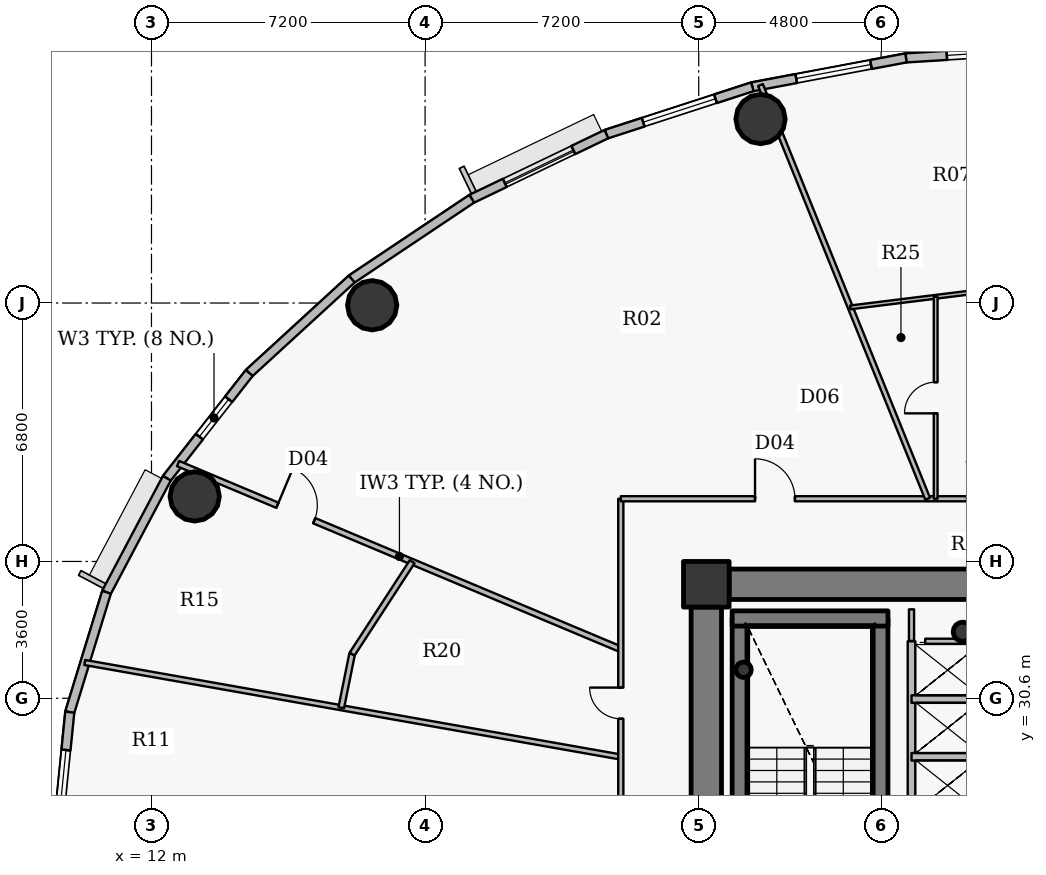
"""IFC4 building model, lengths in metres.
Left out: names, types, materials, properties, quantities, classifications, styles, units other than length and angle.
Written with IfcOpenShell. Run it as: python <this file> out.ifc"""

import sys

from ifc_helpers import new_model, si_unit, direction, frame, frame_2d, origin, origin_2d, place, context, subcontext, project, spatial, rectangle, hollow_circle, extrude, source, transform, mapped, element, fill, save


model = new_model("IFC4")
c1 = context("Model", 3, precision=1e-05, world=origin(), true_north=direction((0.0, 1.0)))
c2 = subcontext(c1, "Body", "Model", "MODEL_VIEW")
j1 = project(units=[si_unit("LENGTHUNIT", "METRE"), si_unit("PLANEANGLEUNIT", "RADIAN")], contexts=[c1])
p1 = place(None, origin())
s1 = spatial("IfcSite", under=j1, at=p1, CompositionType="ELEMENT")
p2 = place(p1, origin())
s2 = spatial("IfcBuilding", under=s1, at=p2, CompositionType="ELEMENT")
p3 = place(p2, frame((0.0, 0.0, 186.15)))
s3 = spatial("IfcBuildingStorey", under=s2, at=p3, CompositionType="ELEMENT", Elevation=186.15)
p4 = place(p3, frame((26.6, 33.6, 0.0), z_axis=(0.0, 0.0, 1.0), x_axis=(1.0, 0.0, 0.0)))
e1 = element("IfcColumn", 1, at=p4, inside=s3, PredefinedType="COLUMN", context=c2, shape_type="SweptSolid", body=[
    extrude(rectangle(XDim=1.2, YDim=1.2, at=origin_2d()), origin(), (0.0, 0.0, 1.0), 3.75),
])
p5 = place(p3, frame((33.35, 32.35, 0.0), z_axis=(0.0, 0.0, 1.0), x_axis=(1.0, 0.0, 0.0)))
e2 = element("IfcColumn", 2, at=p5, inside=s3, PredefinedType="COLUMN", context=c2, shape_type="SweptSolid", body=[
    extrude(hollow_circle(Radius=0.254, WallThickness=0.02, at=origin_2d()), origin(), (0.0, 0.0, 1.0), 3.75),
])
p6 = place(p3, frame((27.48, 24.1, 0.0), z_axis=(0.0, 0.0, 1.0), x_axis=(0.0, 1.0, 0.0)))
e3 = element("IfcWall", 3, at=p6, inside=s3, PredefinedType="SHEAR", context=c2, shape_type="SweptSolid", body=[
    extrude(rectangle(XDim=8.6, YDim=0.4, at=frame_2d((4.3, 0.0))), origin(), (0.0, 0.0, 1.0), 3.75),
])
p7 = place(p3, frame((31.18, 27.8, 0.0), z_axis=(0.0, 0.0, 1.0), x_axis=(0.0, 1.0, 0.0)))
e4 = element("IfcWall", 4, at=p7, inside=s3, PredefinedType="SHEAR", context=c2, shape_type="SweptSolid", body=[
    extrude(rectangle(XDim=4.9, YDim=0.4, at=frame_2d((2.45, 0.0))), origin(), (0.0, 0.0, 1.0), 3.75),
])
p8 = place(p3, frame((27.28, 32.7, 0.0), z_axis=(0.0, 0.0, 1.0), x_axis=(1.0, 0.0, 0.0)))
e5 = element("IfcWall", 5, at=p8, inside=s3, PredefinedType="SHEAR", context=c2, shape_type="SweptSolid", body=[
    extrude(rectangle(XDim=4.1, YDim=0.4, at=frame_2d((2.05, 0.0))), origin(), (0.0, 0.0, 1.0), 3.75),
])
p9 = place(p3, frame((27.58, 31.35, 0.0), z_axis=(0.0, 0.0, 1.0), x_axis=(1.0, 0.0, 0.0)))
e6 = element("IfcColumn", 6, at=p9, inside=s3, PredefinedType="COLUMN", context=c2, shape_type="SweptSolid", body=[
    extrude(hollow_circle(Radius=0.203, WallThickness=0.016, at=origin_2d()), origin(), (0.0, 0.0, 1.0), 3.75),
])
p10 = place(p3, frame((27.2, 33.6, 0.0), z_axis=(0.0, 0.0, 1.0), x_axis=(1.0, 0.0, 0.0)))
e7 = element("IfcWall", 7, at=p10, inside=s3, PredefinedType="SHEAR", context=c2, shape_type="SweptSolid", body=[
    extrude(rectangle(XDim=17.6, YDim=0.8, at=frame_2d((8.8, 0.0))), origin(), (0.0, 0.0, 1.0), 2.95),
])
p11 = place(p10, frame((13.45, 0.0, 0.0)))
e8 = element("IfcOpeningElement", 8, at=p11, cuts=e7, PredefinedType="OPENING", context=c2, shape_type="SweptSolid", body=[
    extrude(rectangle(XDim=1.15, YDim=2.15, at=origin_2d()), frame((0.575, 0.41, 1.075), z_axis=(0.0, -1.0, 0.0), x_axis=(1.0, 0.0, 0.0)), (0.0, 0.0, 1.0), 0.82),
])
p12 = place(p3, frame((26.6, 21.0, 0.0), z_axis=(0.0, 0.0, 1.0), x_axis=(0.0, 1.0, 0.0)))
e9 = element("IfcWall", 9, at=p12, inside=s3, PredefinedType="SHEAR", context=c2, shape_type="SweptSolid", body=[
    extrude(rectangle(XDim=12.0, YDim=0.8, at=frame_2d((6.0, 0.0))), origin(), (0.0, 0.0, 1.0), 2.95),
])
p13 = place(p12, frame((1.061, 0.0, 0.0)))
e10 = element("IfcOpeningElement", 10, at=p13, cuts=e9, PredefinedType="OPENING", context=c2, shape_type="SweptSolid", body=[
    extrude(rectangle(XDim=1.15, YDim=2.15, at=origin_2d()), frame((0.575, 0.41, 1.075), z_axis=(0.0, -1.0, 0.0), x_axis=(1.0, 0.0, 0.0)), (0.0, 0.0, 1.0), 0.82),
])
for number, where, z_axis, x_axis in (
    (11, (28.027, 45.841, 0.0), (0.0, 0.0, 1.0), (1.0, 0.0, 0.0)),
    (12, (17.808, 40.942, 0.0), (0.0, 0.0, 1.0), (1.0, 0.0, 0.0)),
    (13, (13.137, 35.911, 0.0), (0.0, 0.0, 1.0), (1.0, 0.0, 0.0)),
):
    element("IfcColumn", number, at=place(p3, frame(where, z_axis=z_axis, x_axis=x_axis)), inside=s3, PredefinedType="COLUMN", context=c2, shape_type="SweptSolid", body=[
        extrude(hollow_circle(Radius=0.65, WallThickness=0.04, at=origin_2d()), origin(), (0.0, 0.0, 1.0), 3.75),
    ])
p14 = place(p3, frame((31.854, 47.449, 0.0), z_axis=(0.0, 0.0, 1.0), x_axis=(0.998104600619, 0.061540281305, 0.0)))
e14 = element("IfcWall", 14, at=p14, inside=s3, PredefinedType="SOLIDWALL", context=c2, shape_type="SweptSolid", body=[
    extrude(rectangle(XDim=4.154, YDim=0.24, at=frame_2d((2.077, 0.0))), origin(), (0.0, 0.0, 1.0), 3.5),
])
p15 = place(p14, frame((1.077, 0.0, 0.9)))
e15 = element("IfcOpeningElement", 15, at=p15, cuts=e14, PredefinedType="OPENING", context=c2, shape_type="SweptSolid", body=[
    extrude(rectangle(XDim=2.0, YDim=1.75, at=origin_2d()), frame((1.0, 0.13, 0.875), z_axis=(0.0, -1.0, 0.0), x_axis=(1.0, 0.0, 0.0)), (0.0, 0.0, 1.0), 0.26),
])
p16 = place(p3, frame((27.811, 46.689, 0.0), z_axis=(0.0, 0.0, 1.0), x_axis=(0.982788108205, 0.184736391573, 0.0)))
e16 = element("IfcWall", 16, at=p16, inside=s3, PredefinedType="SOLIDWALL", context=c2, shape_type="SweptSolid", body=[
    extrude(rectangle(XDim=4.114, YDim=0.24, at=frame_2d((2.057, 0.0))), origin(), (0.0, 0.0, 1.0), 3.5),
])
p17 = place(p16, frame((1.176, 0.0, 0.9)))
e17 = element("IfcOpeningElement", 17, at=p17, cuts=e16, PredefinedType="OPENING", context=c2, shape_type="SweptSolid", body=[
    extrude(rectangle(XDim=2.0, YDim=1.75, at=origin_2d()), frame((1.0, 0.13, 0.875), z_axis=(0.0, -1.0, 0.0), x_axis=(1.0, 0.0, 0.0)), (0.0, 0.0, 1.0), 0.26),
])
p18 = place(p3, frame((23.97, 45.444, 0.0), z_axis=(0.0, 0.0, 1.0), x_axis=(0.951209870236, 0.30854462038, 0.0)))
e18 = element("IfcWall", 18, at=p18, inside=s3, PredefinedType="SOLIDWALL", context=c2, shape_type="SweptSolid", body=[
    extrude(rectangle(XDim=4.038, YDim=0.24, at=frame_2d((2.019, 0.0))), origin(), (0.0, 0.0, 1.0), 3.5),
])
p19 = place(p18, frame((1.019, 0.0, 0.9)))
e19 = element("IfcOpeningElement", 19, at=p19, cuts=e18, PredefinedType="OPENING", context=c2, shape_type="SweptSolid", body=[
    extrude(rectangle(XDim=2.0, YDim=1.75, at=origin_2d()), frame((1.0, 0.13, 0.875), z_axis=(0.0, -1.0, 0.0), x_axis=(1.0, 0.0, 0.0)), (0.0, 0.0, 1.0), 0.26),
])
p20 = place(p3, frame((20.427, 43.743, 0.0), z_axis=(0.0, 0.0, 1.0), x_axis=(0.901564733809, 0.432644231155, 0.0)))
e20 = element("IfcWall", 20, at=p20, inside=s3, PredefinedType="SOLIDWALL", context=c2, shape_type="SweptSolid", body=[
    extrude(rectangle(XDim=3.93, YDim=0.24, at=frame_2d((1.965, 0.0))), origin(), (0.0, 0.0, 1.0), 3.5),
])
p21 = place(p20, frame((0.965, 0.0, 0.9)))
e21 = element("IfcOpeningElement", 21, at=p21, cuts=e20, PredefinedType="OPENING", context=c2, shape_type="SweptSolid", body=[
    extrude(rectangle(XDim=2.0, YDim=1.75, at=origin_2d()), frame((1.0, 0.13, 0.875), z_axis=(0.0, -1.0, 0.0), x_axis=(1.0, 0.0, 0.0)), (0.0, 0.0, 1.0), 0.26),
])
p22 = place(p3, frame((17.268, 41.631, 0.0), z_axis=(0.0, 0.0, 1.0), x_axis=(0.831228998277, 0.555930168657, 0.0)))
e22 = element("IfcWall", 22, at=p22, inside=s3, PredefinedType="SOLIDWALL", context=c2, shape_type="SweptSolid", body=[
    extrude(rectangle(XDim=3.8, YDim=0.24, at=frame_2d((1.9, 0.0))), origin(), (0.0, 0.0, 1.0), 3.5),
])
p23 = place(p3, frame((14.572, 39.158, 0.0), z_axis=(0.0, 0.0, 1.0), x_axis=(0.737076565834, 0.675809245349, 0.0)))
e23 = element("IfcWall", 23, at=p23, inside=s3, PredefinedType="SOLIDWALL", context=c2, shape_type="SweptSolid", body=[
    extrude(rectangle(XDim=3.658, YDim=0.24, at=frame_2d((1.829, 0.0))), origin(), (0.0, 0.0, 1.0), 3.5),
])
p24 = place(p3, frame((12.404, 36.388, 0.0), z_axis=(0.0, 0.0, 1.0), x_axis=(0.616287674549, 0.787521112224, 0.0)))
e24 = element("IfcWall", 24, at=p24, inside=s3, PredefinedType="SOLIDWALL", context=c2, shape_type="SweptSolid", body=[
    extrude(rectangle(XDim=3.517, YDim=0.24, at=frame_2d((1.759, 0.0))), origin(), (0.0, 0.0, 1.0), 3.5),
])
p25 = place(p24, frame((1.39, 0.0, 0.9)))
e25 = element("IfcOpeningElement", 25, at=p25, cuts=e24, PredefinedType="OPENING", context=c2, shape_type="SweptSolid", body=[
    extrude(rectangle(XDim=1.25, YDim=1.65, at=origin_2d()), frame((0.625, 0.13, 0.825), z_axis=(0.0, -1.0, 0.0), x_axis=(1.0, 0.0, 0.0)), (0.0, 0.0, 1.0), 0.26),
])
p26 = place(p3, frame((10.817, 33.389, 0.0), z_axis=(0.0, 0.0, 1.0), x_axis=(0.467586874938, 0.88394712194, 0.0)))
e26 = element("IfcWall", 26, at=p26, inside=s3, PredefinedType="SOLIDWALL", context=c2, shape_type="SweptSolid", body=[
    extrude(rectangle(XDim=3.393, YDim=0.24, at=frame_2d((1.697, 0.0))), origin(), (0.0, 0.0, 1.0), 3.5),
])
p27 = place(p3, frame((9.85, 30.234, 0.0), z_axis=(0.0, 0.0, 1.0), x_axis=(0.293097995113, 0.956082405058, 0.0)))
e27 = element("IfcWall", 27, at=p27, inside=s3, PredefinedType="SOLIDWALL", context=c2, shape_type="SweptSolid", body=[
    extrude(rectangle(XDim=3.3, YDim=0.24, at=frame_2d((1.65, 0.0))), origin(), (0.0, 0.0, 1.0), 3.5),
])
p28 = place(p3, frame((9.525, 27.0, 0.0), z_axis=(0.0, 0.0, 1.0), x_axis=(0.100061534614, 0.994981250723, 0.0)))
e28 = element("IfcWall", 28, at=p28, inside=s3, PredefinedType="SOLIDWALL", context=c2, shape_type="SweptSolid", body=[
    extrude(rectangle(XDim=3.25, YDim=0.24, at=frame_2d((1.625, 0.0))), origin(), (0.0, 0.0, 1.0), 3.5),
])
p29 = place(p28, frame((1.0, 0.0, 0.9)))
e29 = element("IfcOpeningElement", 29, at=p29, cuts=e28, PredefinedType="OPENING", context=c2, shape_type="SweptSolid", body=[
    extrude(rectangle(XDim=1.25, YDim=1.65, at=origin_2d()), frame((0.625, 0.13, 0.825), z_axis=(0.0, -1.0, 0.0), x_axis=(1.0, 0.0, 0.0)), (0.0, 0.0, 1.0), 0.26),
])
p30 = place(p3, frame((10.246, 31.541, 0.0), z_axis=(0.0, 0.0, 1.0), x_axis=(0.984807060168, -0.173652106936, 0.0)))
e30 = element("IfcWall", 30, at=p30, inside=s3, PredefinedType="PARTITIONING", context=c2, shape_type="SweptSolid", body=[
    extrude(rectangle(XDim=14.322, YDim=0.135, at=frame_2d((7.161, 0.0))), origin(), (0.0, 0.0, 1.0), 2.935),
])
p31 = place(p3, frame((12.7, 36.775, 0.0), z_axis=(0.0, 0.0, 1.0), x_axis=(0.922134788074, -0.386868753745, 0.0)))
e31 = element("IfcWall", 31, at=p31, inside=s3, PredefinedType="PARTITIONING", context=c2, shape_type="SweptSolid", body=[
    extrude(rectangle(XDim=12.633, YDim=0.15, at=frame_2d((6.317, 0.0))), origin(), (0.0, 0.0, 1.0), 2.935),
])
p32 = place(p31, frame((2.834, 0.0, 0.0)))
e32 = element("IfcOpeningElement", 32, at=p32, cuts=e31, PredefinedType="OPENING", context=c2, shape_type="SweptSolid", body=[
    extrude(rectangle(XDim=1.05, YDim=2.15, at=origin_2d()), frame((0.525, 0.085, 1.075), z_axis=(0.0, -1.0, 0.0), x_axis=(1.0, 0.0, 0.0)), (0.0, 0.0, 1.0), 0.17),
])
p33 = place(p3, frame((16.994, 30.351, 0.0), z_axis=(0.0, 0.0, 1.0), x_axis=(0.198136589313, 0.98017441916, 0.0)))
e33 = element("IfcWall", 33, at=p33, inside=s3, PredefinedType="PARTITIONING", context=c2, shape_type="SweptSolid", body=[
    extrude(rectangle(XDim=1.44, YDim=0.15, at=frame_2d((0.72, 0.0))), origin(), (0.0, 0.0, 1.0), 3.5),
])
p34 = place(p3, frame((17.279, 31.763, 0.0), z_axis=(0.0, 0.0, 1.0), x_axis=(0.545388220317, 0.8381835653, 0.0)))
e34 = element("IfcWall", 34, at=p34, inside=s3, PredefinedType="PARTITIONING", context=c2, shape_type="SweptSolid", body=[
    extrude(rectangle(XDim=2.897, YDim=0.15, at=frame_2d((1.448, 0.0))), origin(), (0.0, 0.0, 1.0), 2.935),
])
p35 = place(p3, frame((24.35, 27.95, 0.0), z_axis=(0.0, 0.0, 1.0), x_axis=(0.0, 1.0, 0.0)))
e35 = element("IfcWall", 35, at=p35, inside=s3, PredefinedType="PARTITIONING", context=c2, shape_type="SweptSolid", body=[
    extrude(rectangle(XDim=7.9, YDim=0.135, at=frame_2d((3.95, 0.0))), origin(), (0.0, 0.0, 1.0), 2.935),
])
p36 = place(p35, frame((2.111, 0.0, 0.0)))
e36 = element("IfcOpeningElement", 36, at=p36, cuts=e35, PredefinedType="OPENING", context=c2, shape_type="SweptSolid", body=[
    extrude(rectangle(XDim=0.82, YDim=2.1, at=origin_2d()), frame((0.41, 0.078, 1.05), z_axis=(0.0, -1.0, 0.0), x_axis=(1.0, 0.0, 0.0)), (0.0, 0.0, 1.0), 0.155),
])
p37 = place(p3, frame((24.35, 35.85, 0.0), z_axis=(0.0, 0.0, 1.0), x_axis=(1.0, 0.0, 0.0)))
e37 = element("IfcWall", 37, at=p37, inside=s3, PredefinedType="PARTITIONING", context=c2, shape_type="SweptSolid", body=[
    extrude(rectangle(XDim=9.109, YDim=0.135, at=frame_2d((4.554, 0.0))), origin(), (0.0, 0.0, 1.0), 2.935),
])
p38 = place(p37, frame((3.532, 0.0, 0.0)))
e38 = element("IfcOpeningElement", 38, at=p38, cuts=e37, PredefinedType="OPENING", context=c2, shape_type="SweptSolid", body=[
    extrude(rectangle(XDim=1.05, YDim=2.15, at=origin_2d()), frame((0.525, 0.078, 1.075), z_axis=(0.0, -1.0, 0.0), x_axis=(1.0, 0.0, 0.0)), (0.0, 0.0, 1.0), 0.155),
])
p39 = place(p3, frame((28.027, 46.735, 0.0), z_axis=(0.0, 0.0, 1.0), x_axis=(0.374604711709, -0.927184614824, 0.0)))
e39 = element("IfcWall", 39, at=p39, inside=s3, PredefinedType="PARTITIONING", context=c2, shape_type="SweptSolid", body=[
    extrude(rectangle(XDim=11.74, YDim=0.135, at=frame_2d((5.87, 0.0))), origin(), (0.0, 0.0, 1.0), 2.935),
])
p40 = place(p3, frame((30.39, 40.885, 0.0), z_axis=(0.0, 0.0, 1.0), x_axis=(0.992397005414, 0.123077957591, 0.0)))
e40 = element("IfcWall", 40, at=p40, inside=s3, PredefinedType="PARTITIONING", context=c2, shape_type="SweptSolid", body=[
    extrude(rectangle(XDim=5.653, YDim=0.1, at=frame_2d((2.827, 0.0))), origin(), (0.0, 0.0, 1.0), 2.935),
])
p41 = place(p3, frame((32.0, 24.1, 0.0), z_axis=(0.0, 0.0, 1.0), x_axis=(0.0, 1.0, 0.0)))
e41 = element("IfcWall", 41, at=p41, inside=s3, PredefinedType="PARTITIONING", context=c2, shape_type="SweptSolid", body=[
    extrude(rectangle(XDim=8.0, YDim=0.2, at=frame_2d((4.0, 0.0))), origin(), (0.0, 0.0, 1.0), 3.5),
])
for number, where, z_axis, x_axis in (
    (42, (32.0, 29.06, 0.0), (0.0, 0.0, 1.0), (1.0, 0.0, 0.0)),
    (43, (32.0, 30.58, 0.0), (0.0, 0.0, 1.0), (1.0, 0.0, 0.0)),
):
    element("IfcWall", number, at=place(p3, frame(where, z_axis=z_axis, x_axis=x_axis)), inside=s3, PredefinedType="PARTITIONING", context=c2, shape_type="SweptSolid", body=[
        extrude(rectangle(XDim=1.9, YDim=0.2, at=frame_2d((0.95, 0.0))), origin(), (0.0, 0.0, 1.0), 3.085),
    ])
p42 = place(p3, frame((32.636, 35.85, 0.0), z_axis=(0.0, 0.0, 1.0), x_axis=(0.0, 1.0, 0.0)))
e44 = element("IfcWall", 44, at=p42, inside=s3, PredefinedType="PARTITIONING", context=c2, shape_type="SweptSolid", body=[
    extrude(rectangle(XDim=5.314, YDim=0.1, at=frame_2d((2.657, 0.0))), origin(), (0.0, 0.0, 1.0), 3.125),
])
p43 = place(p42, frame((2.247, 0.0, 0.0)))
e45 = element("IfcOpeningElement", 45, at=p43, cuts=e44, PredefinedType="OPENING", context=c2, shape_type="SweptSolid", body=[
    extrude(rectangle(XDim=0.82, YDim=2.1, at=origin_2d()), frame((0.41, 0.06, 1.05), z_axis=(0.0, -1.0, 0.0), x_axis=(1.0, 0.0, 0.0)), (0.0, 0.0, 1.0), 0.12),
])
p44 = place(p3, frame((32.36, 32.1, 0.0), z_axis=(0.0, 0.0, 1.0), x_axis=(1.0, 0.0, 0.0)))
e46 = element("IfcWall", 46, at=p44, inside=s3, PredefinedType="PARTITIONING", context=c2, shape_type="SweptSolid", body=[
    extrude(rectangle(XDim=1.18, YDim=0.135, at=frame_2d((0.59, 0.0))), origin(), (0.0, 0.0, 1.0), 3.085),
])
p45 = place(p3, frame((32.0, 32.94, 0.0), z_axis=(0.0, 0.0, 1.0), x_axis=(0.0, -1.0, 0.0)))
e47 = element("IfcWall", 47, at=p45, inside=s3, PredefinedType="PARTITIONING", context=c2, shape_type="SweptSolid", body=[
    extrude(rectangle(XDim=0.83, YDim=0.135, at=frame_2d((0.415, 0.0))), origin(), (0.0, 0.0, 1.0), 3.035),
])
p46 = place(p3, frame((27.19, 34.0, 0.0), z_axis=(0.0, 0.0, 1.0), x_axis=(-1.0, 0.0, 0.0)))
e48 = element("IfcWall", 48, at=p46, inside=s3, PredefinedType="PARTITIONING", context=c2, shape_type="SweptSolid", body=[
    extrude(rectangle(XDim=0.99, YDim=0.135, at=frame_2d((0.495, 0.0))), origin(), (0.0, 0.0, 1.0), 2.935),
])
p47 = place(p3, frame((26.2, 33.692, 0.0), z_axis=(0.0, 0.0, 1.0), x_axis=(0.0, -1.0, 0.0)))
e49 = element("IfcWall", 49, at=p47, inside=s3, PredefinedType="PARTITIONING", context=c2, shape_type="SweptSolid", body=[
    extrude(rectangle(XDim=0.682, YDim=0.135, at=frame_2d((0.341, 0.0))), origin(), (0.0, 0.0, 1.0), 3.5),
])
m1 = source(origin(), c2, "Body", "SweptSolid", [
    extrude(rectangle(XDim=2.0, YDim=1.75, at=origin_2d()), frame((1.0, 0.03, 0.875), z_axis=(0.0, -1.0, 0.0), x_axis=(1.0, 0.0, 0.0)), (0.0, 0.0, 1.0), 0.06),
])
p48 = place(p15, origin())
e50 = element("IfcWindow", 50, at=p48, inside=s3, PartitioningType="DOUBLE_PANEL_VERTICAL", PredefinedType="WINDOW", context=c2, shape_type="MappedRepresentation", body=[
    mapped(m1, transform((0.0, 0.0, 0.0), x_axis=(1.0, 0.0, 0.0), y_axis=(0.0, 1.0, 0.0), z_axis=(0.0, 0.0, 1.0), scale=1.0)),
])
fill(e15, e50)
p49 = place(p17, origin())
e51 = element("IfcWindow", 51, at=p49, inside=s3, PartitioningType="DOUBLE_PANEL_VERTICAL", PredefinedType="WINDOW", context=c2, shape_type="MappedRepresentation", body=[
    mapped(m1, transform((0.0, 0.0, 0.0), x_axis=(1.0, 0.0, 0.0), y_axis=(0.0, 1.0, 0.0), z_axis=(0.0, 0.0, 1.0), scale=1.0)),
])
fill(e17, e51)
p50 = place(p19, origin())
e52 = element("IfcWindow", 52, at=p50, inside=s3, PartitioningType="DOUBLE_PANEL_VERTICAL", PredefinedType="WINDOW", context=c2, shape_type="MappedRepresentation", body=[
    mapped(m1, transform((0.0, 0.0, 0.0), x_axis=(1.0, 0.0, 0.0), y_axis=(0.0, 1.0, 0.0), z_axis=(0.0, 0.0, 1.0), scale=1.0)),
])
fill(e19, e52)
p51 = place(p21, origin())
e53 = element("IfcWindow", 53, at=p51, inside=s3, PartitioningType="DOUBLE_PANEL_VERTICAL", PredefinedType="WINDOW", context=c2, shape_type="MappedRepresentation", body=[
    mapped(m1, transform((0.0, 0.0, 0.0), x_axis=(1.0, 0.0, 0.0), y_axis=(0.0, 1.0, 0.0), z_axis=(0.0, 0.0, 1.0), scale=1.0)),
])
fill(e21, e53)
m2 = source(origin(), c2, "Body", "SweptSolid", [
    extrude(rectangle(XDim=1.25, YDim=1.65, at=origin_2d()), frame((0.625, 0.03, 0.825), z_axis=(0.0, -1.0, 0.0), x_axis=(1.0, 0.0, 0.0)), (0.0, 0.0, 1.0), 0.06),
])
p52 = place(p25, origin())
e54 = element("IfcWindow", 54, at=p52, inside=s3, PartitioningType="SINGLE_PANEL", PredefinedType="WINDOW", context=c2, shape_type="MappedRepresentation", body=[
    mapped(m2, transform((0.0, 0.0, 0.0), x_axis=(1.0, 0.0, 0.0), y_axis=(0.0, 1.0, 0.0), z_axis=(0.0, 0.0, 1.0), scale=1.0)),
])
fill(e25, e54)
p53 = place(p29, origin())
e55 = element("IfcWindow", 55, at=p53, inside=s3, PartitioningType="SINGLE_PANEL", PredefinedType="WINDOW", context=c2, shape_type="MappedRepresentation", body=[
    mapped(m2, transform((0.0, 0.0, 0.0), x_axis=(1.0, 0.0, 0.0), y_axis=(0.0, 1.0, 0.0), z_axis=(0.0, 0.0, 1.0), scale=1.0)),
])
fill(e29, e55)
m3 = source(origin(), c2, "Body", "SweptSolid", [
    extrude(rectangle(XDim=0.82, YDim=2.1, at=origin_2d()), frame((0.41, 0.025, 1.05), z_axis=(0.0, -1.0, 0.0), x_axis=(1.0, 0.0, 0.0)), (0.0, 0.0, 1.0), 0.05),
])
p54 = place(p43, origin())
e56 = element("IfcDoor", 56, at=p54, inside=s3, OperationType="SINGLE_SWING_LEFT", PredefinedType="DOOR", context=c2, shape_type="MappedRepresentation", body=[
    mapped(m3, transform((0.0, 0.0, 0.0), x_axis=(1.0, 0.0, 0.0), y_axis=(0.0, 1.0, 0.0), z_axis=(0.0, 0.0, 1.0), scale=1.0)),
])
fill(e45, e56)
m4 = source(origin(), c2, "Body", "SweptSolid", [
    extrude(rectangle(XDim=1.05, YDim=2.15, at=origin_2d()), frame((0.525, 0.025, 1.075), z_axis=(0.0, -1.0, 0.0), x_axis=(1.0, 0.0, 0.0)), (0.0, 0.0, 1.0), 0.05),
])
p55 = place(p38, origin())
e57 = element("IfcDoor", 57, at=p55, inside=s3, OperationType="SINGLE_SWING_LEFT", PredefinedType="DOOR", context=c2, shape_type="MappedRepresentation", body=[
    mapped(m4, transform((0.0, 0.0, 0.0), x_axis=(1.0, 0.0, 0.0), y_axis=(0.0, 1.0, 0.0), z_axis=(0.0, 0.0, 1.0), scale=1.0)),
])
fill(e38, e57)
p56 = place(p36, origin())
e58 = element("IfcDoor", 58, at=p56, inside=s3, OperationType="SINGLE_SWING_RIGHT", PredefinedType="DOOR", context=c2, shape_type="MappedRepresentation", body=[
    mapped(m3, transform((0.0, 0.0, 0.0), x_axis=(1.0, 0.0, 0.0), y_axis=(0.0, 1.0, 0.0), z_axis=(0.0, 0.0, 1.0), scale=1.0)),
])
fill(e36, e58)
p57 = place(p32, origin())
e59 = element("IfcDoor", 59, at=p57, inside=s3, OperationType="SINGLE_SWING_LEFT", PredefinedType="DOOR", context=c2, shape_type="MappedRepresentation", body=[
    mapped(m4, transform((0.0, 0.0, 0.0), x_axis=(1.0, 0.0, 0.0), y_axis=(0.0, 1.0, 0.0), z_axis=(0.0, 0.0, 1.0), scale=1.0)),
])
fill(e32, e59)
save(model, sys.argv[1])
